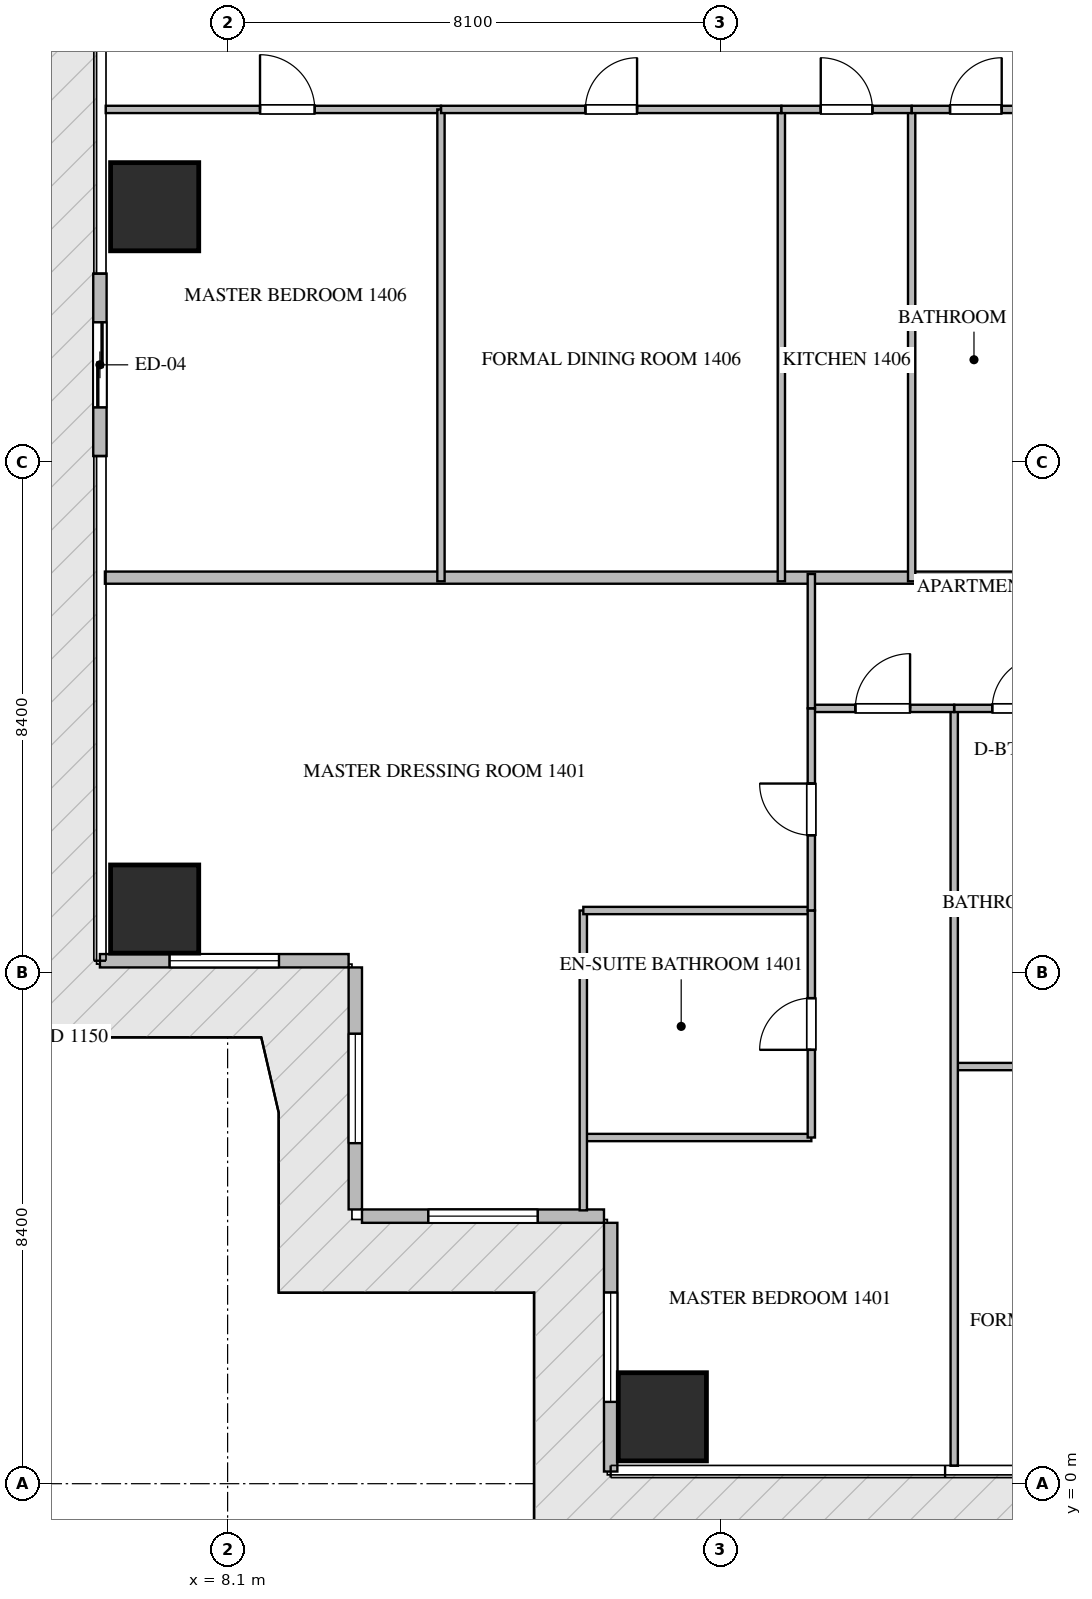
"""IFC4 building model, lengths in metres.
Left out: names, types, materials, properties, quantities, classifications, styles, units other than length and angle.
Written with IfcOpenShell. Run it as: python <this file> out.ifc"""

import sys

from ifc_helpers import new_model, si_unit, direction, frame, frame_2d, origin, origin_2d, place, context, subcontext, project, spatial, rectangle, extrude, source, transform, mapped, element, fill, save


model = new_model("IFC4")
c1 = context("Model", 3, precision=1e-05, world=origin(), true_north=direction((0.0, 1.0)))
c2 = subcontext(c1, "Body", "Model", "MODEL_VIEW")
j1 = project(units=[si_unit("LENGTHUNIT", "METRE"), si_unit("PLANEANGLEUNIT", "RADIAN")], contexts=[c1])
p1 = place(None, origin())
s1 = spatial("IfcSite", under=j1, at=p1, CompositionType="ELEMENT")
p2 = place(p1, origin())
s2 = spatial("IfcBuilding", under=s1, at=p2, CompositionType="ELEMENT")
p3 = place(p2, frame((0.0, 0.0, 60.45)))
s3 = spatial("IfcBuildingStorey", under=s2, at=p3, CompositionType="ELEMENT", Elevation=60.45)
m1 = source(origin(), c2, "Body", "SweptSolid", [
    extrude(rectangle(XDim=1.45, YDim=1.45, at=origin_2d()), origin(), (0.0, 0.0, 1.0), 3.75),
])
for number, where, z_axis, x_axis in (
    (1, (15.25, 1.1, -0.26), (0.0, 0.0, 1.0), (1.0, 0.0, 0.0)),
    (2, (6.9, 9.45, -0.26), (0.0, 0.0, 1.0), (1.0, 0.0, 0.0)),
    (3, (6.9, 21.0, -0.26), (0.0, 0.0, 1.0), (1.0, 0.0, 0.0)),
):
    element("IfcColumn", number, at=place(p3, frame(where, z_axis=z_axis, x_axis=x_axis)), inside=s3, PredefinedType="COLUMN", context=c2, shape_type="MappedRepresentation", body=[
        mapped(m1, transform((0.0, 0.0, 0.0), scale=1.0)),
    ])
p4 = place(p3, frame((6.0, 19.9, 0.0), z_axis=(0.0, 0.0, 1.0), x_axis=(0.0, -1.0, 0.0)))
e4 = element("IfcWall", 4, at=p4, inside=s3, PredefinedType="ELEMENTEDWALL", context=c2, shape_type="SweptSolid", body=[
    extrude(rectangle(XDim=3.0, YDim=0.22, at=frame_2d((1.5, 0.0))), origin(), (0.0, 0.0, 1.0), 3.475),
])
p5 = place(p4, frame((0.8, 0.0, 0.0)))
e5 = element("IfcOpeningElement", 5, at=p5, cuts=e4, PredefinedType="OPENING", context=c2, shape_type="SweptSolid", body=[
    extrude(rectangle(XDim=1.4, YDim=2.25, at=frame_2d((0.7, 1.125))), frame((0.0, 0.12, 0.0), z_axis=(0.0, -1.0, 0.0), x_axis=(1.0, 0.0, 0.0)), (0.0, 0.0, 1.0), 0.24),
])
p6 = place(p3, frame((6.0, 8.6, 0.0), z_axis=(0.0, 0.0, 1.0), x_axis=(1.0, 0.0, 0.0)))
e6 = element("IfcWall", 6, at=p6, inside=s3, PredefinedType="ELEMENTEDWALL", context=c2, shape_type="SweptSolid", body=[
    extrude(rectangle(XDim=4.09, YDim=0.22, at=frame_2d((2.045, 0.0))), origin(), (0.0, 0.0, 1.0), 3.475),
])
p7 = place(p6, frame((1.145, 0.0, 0.65)))
e7 = element("IfcOpeningElement", 7, at=p7, cuts=e6, PredefinedType="OPENING", context=c2, shape_type="SweptSolid", body=[
    extrude(rectangle(XDim=1.8, YDim=2.1, at=frame_2d((0.9, 1.05))), frame((0.0, 0.12, 0.0), z_axis=(0.0, -1.0, 0.0), x_axis=(1.0, 0.0, 0.0)), (0.0, 0.0, 1.0), 0.24),
])
p8 = place(p3, frame((10.2, 8.49, 0.0), z_axis=(0.0, 0.0, 1.0), x_axis=(0.0, -1.0, 0.0)))
e8 = element("IfcWall", 8, at=p8, inside=s3, PredefinedType="ELEMENTEDWALL", context=c2, shape_type="SweptSolid", body=[
    extrude(rectangle(XDim=3.98, YDim=0.22, at=frame_2d((1.99, 0.0))), origin(), (0.0, 0.0, 1.0), 3.475),
])
p9 = place(p8, frame((1.09, 0.0, 0.65)))
e9 = element("IfcOpeningElement", 9, at=p9, cuts=e8, PredefinedType="OPENING", context=c2, shape_type="SweptSolid", body=[
    extrude(rectangle(XDim=1.8, YDim=2.1, at=frame_2d((0.9, 1.05))), frame((0.0, 0.12, 0.0), z_axis=(0.0, -1.0, 0.0), x_axis=(1.0, 0.0, 0.0)), (0.0, 0.0, 1.0), 0.24),
])
p10 = place(p3, frame((10.31, 4.4, 0.0), z_axis=(0.0, 0.0, 1.0), x_axis=(1.0, 0.0, 0.0)))
e10 = element("IfcWall", 10, at=p10, inside=s3, PredefinedType="ELEMENTEDWALL", context=c2, shape_type="SweptSolid", body=[
    extrude(rectangle(XDim=3.98, YDim=0.22, at=frame_2d((1.99, 0.0))), origin(), (0.0, 0.0, 1.0), 3.475),
])
p11 = place(p10, frame((1.09, 0.0, 0.65)))
e11 = element("IfcOpeningElement", 11, at=p11, cuts=e10, PredefinedType="OPENING", context=c2, shape_type="SweptSolid", body=[
    extrude(rectangle(XDim=1.8, YDim=2.1, at=frame_2d((0.9, 1.05))), frame((0.0, 0.12, 0.0), z_axis=(0.0, -1.0, 0.0), x_axis=(1.0, 0.0, 0.0)), (0.0, 0.0, 1.0), 0.24),
])
p12 = place(p3, frame((14.4, 4.29, 0.0), z_axis=(0.0, 0.0, 1.0), x_axis=(0.0, -1.0, 0.0)))
e12 = element("IfcWall", 12, at=p12, inside=s3, PredefinedType="ELEMENTEDWALL", context=c2, shape_type="SweptSolid", body=[
    extrude(rectangle(XDim=4.09, YDim=0.22, at=frame_2d((2.045, 0.0))), origin(), (0.0, 0.0, 1.0), 3.475),
])
p13 = place(p12, frame((1.145, 0.0, 0.65)))
e13 = element("IfcOpeningElement", 13, at=p13, cuts=e12, PredefinedType="OPENING", context=c2, shape_type="SweptSolid", body=[
    extrude(rectangle(XDim=1.8, YDim=2.1, at=frame_2d((0.9, 1.05))), frame((0.0, 0.12, 0.0), z_axis=(0.0, -1.0, 0.0), x_axis=(1.0, 0.0, 0.0)), (0.0, 0.0, 1.0), 0.24),
])
p14 = place(p3, frame((6.082, 14.9, 0.0), z_axis=(0.0, 0.0, 1.0), x_axis=(1.0, 0.0, 0.0)))
e14 = element("IfcWall", 14, at=p14, inside=s3, PredefinedType="PARTITIONING", context=c2, shape_type="SweptSolid", body=[
    extrude(rectangle(XDim=15.318, YDim=0.2, at=frame_2d((7.659, 0.0))), origin(), (0.0, 0.0, 1.0), 3.49),
])
p15 = place(p3, frame((20.05, 6.86, 0.0), z_axis=(0.0, 0.0, 1.0), x_axis=(1.0, 0.0, 0.0)))
e15 = element("IfcWall", 15, at=p15, inside=s3, PredefinedType="PARTITIONING", context=c2, shape_type="SweptSolid", body=[
    extrude(rectangle(XDim=5.15, YDim=0.12, at=frame_2d((2.575, 0.0))), origin(), (0.0, 0.0, 1.0), 3.49),
])
p16 = place(p3, frame((20.05, 0.295, 0.0), z_axis=(0.0, 0.0, 1.0), x_axis=(0.0, 1.0, 0.0)))
e16 = element("IfcWall", 16, at=p16, inside=s3, PredefinedType="PARTITIONING", context=c2, shape_type="SweptSolid", body=[
    extrude(rectangle(XDim=12.455, YDim=0.12, at=frame_2d((6.228, 0.0))), origin(), (0.0, 0.0, 1.0), 3.49),
])
p17 = place(p3, frame((20.05, 12.75, 0.0), z_axis=(0.0, 0.0, 1.0), x_axis=(1.0, 0.0, 0.0)))
e17 = element("IfcWall", 17, at=p17, inside=s3, PredefinedType="PARTITIONING", context=c2, shape_type="SweptSolid", body=[
    extrude(rectangle(XDim=2.1, YDim=0.12, at=frame_2d((1.05, 0.0))), origin(), (0.0, 0.0, 1.0), 3.49),
])
p18 = place(p17, frame((0.625, 0.0, 0.0)))
e18 = element("IfcOpeningElement", 18, at=p18, cuts=e17, PredefinedType="OPENING", context=c2, shape_type="SweptSolid", body=[
    extrude(rectangle(XDim=0.85, YDim=2.1, at=frame_2d((0.425, 1.05))), frame((0.0, 0.07, 0.0), z_axis=(0.0, -1.0, 0.0), x_axis=(1.0, 0.0, 0.0)), (0.0, 0.0, 1.0), 0.14),
])
p19 = place(p3, frame((17.7, 12.75, 0.0), z_axis=(0.0, 0.0, 1.0), x_axis=(1.0, 0.0, 0.0)))
e19 = element("IfcWall", 19, at=p19, inside=s3, PredefinedType="PARTITIONING", context=c2, shape_type="SweptSolid", body=[
    extrude(rectangle(XDim=2.348, YDim=0.12, at=frame_2d((1.174, 0.0))), origin(), (0.0, 0.0, 1.0), 3.49),
])
p20 = place(p19, frame((0.724, 0.0, 0.0)))
e20 = element("IfcOpeningElement", 20, at=p20, cuts=e19, PredefinedType="OPENING", context=c2, shape_type="SweptSolid", body=[
    extrude(rectangle(XDim=0.9, YDim=2.1, at=frame_2d((0.45, 1.05))), frame((0.0, 0.07, 0.0), z_axis=(0.0, -1.0, 0.0), x_axis=(1.0, 0.0, 0.0)), (0.0, 0.0, 1.0), 0.14),
])
p21 = place(p3, frame((13.95, 5.693, 0.0), z_axis=(0.0, 0.0, 1.0), x_axis=(1.0, 0.0, 0.0)))
e21 = element("IfcWall", 21, at=p21, inside=s3, PredefinedType="PARTITIONING", context=c2, shape_type="SweptSolid", body=[
    extrude(rectangle(XDim=3.75, YDim=0.12, at=frame_2d((1.875, 0.0))), origin(), (0.0, 0.0, 1.0), 3.49),
])
p22 = place(p3, frame((13.95, 4.495, 0.0), z_axis=(0.0, 0.0, 1.0), x_axis=(0.0, 1.0, 0.0)))
e22 = element("IfcWall", 22, at=p22, inside=s3, PredefinedType="PARTITIONING", context=c2, shape_type="SweptSolid", body=[
    extrude(rectangle(XDim=4.931, YDim=0.12, at=frame_2d((2.465, 0.0))), origin(), (0.0, 0.0, 1.0), 3.49),
])
p23 = place(p3, frame((13.95, 9.426, 0.0), z_axis=(0.0, 0.0, 1.0), x_axis=(1.0, 0.0, 0.0)))
e23 = element("IfcWall", 23, at=p23, inside=s3, PredefinedType="PARTITIONING", context=c2, shape_type="SweptSolid", body=[
    extrude(rectangle(XDim=3.75, YDim=0.12, at=frame_2d((1.875, 0.0))), origin(), (0.0, 0.0, 1.0), 2.922),
])
p24 = place(p3, frame((17.7, 5.693, 0.0), z_axis=(0.0, 0.0, 1.0), x_axis=(0.0, 1.0, 0.0)))
e24 = element("IfcWall", 24, at=p24, inside=s3, PredefinedType="PARTITIONING", context=c2, shape_type="SweptSolid", body=[
    extrude(rectangle(XDim=3.733, YDim=0.12, at=frame_2d((1.866, 0.0))), origin(), (0.0, 0.0, 1.0), 3.49),
])
p25 = place(p24, frame((1.442, 0.0, 0.0)))
e25 = element("IfcOpeningElement", 25, at=p25, cuts=e24, PredefinedType="OPENING", context=c2, shape_type="SweptSolid", body=[
    extrude(rectangle(XDim=0.85, YDim=2.1, at=frame_2d((0.425, 1.05))), frame((0.0, 0.07, 0.0), z_axis=(0.0, -1.0, 0.0), x_axis=(1.0, 0.0, 0.0)), (0.0, 0.0, 1.0), 0.14),
])
p26 = place(p3, frame((17.7, 9.428, 0.0), z_axis=(0.0, 0.0, 1.0), x_axis=(0.0, 1.0, 0.0)))
e26 = element("IfcWall", 26, at=p26, inside=s3, PredefinedType="PARTITIONING", context=c2, shape_type="SweptSolid", body=[
    extrude(rectangle(XDim=3.322, YDim=0.12, at=frame_2d((1.661, 0.0))), origin(), (0.0, 0.0, 1.0), 3.49),
])
p27 = place(p26, frame((1.236, 0.0, 0.0)))
e27 = element("IfcOpeningElement", 27, at=p27, cuts=e26, PredefinedType="OPENING", context=c2, shape_type="SweptSolid", body=[
    extrude(rectangle(XDim=0.85, YDim=2.1, at=frame_2d((0.425, 1.05))), frame((0.0, 0.07, 0.0), z_axis=(0.0, -1.0, 0.0), x_axis=(1.0, 0.0, 0.0)), (0.0, 0.0, 1.0), 0.14),
])
p28 = place(p3, frame((17.7, 12.752, 0.0), z_axis=(0.0, 0.0, 1.0), x_axis=(0.0, 1.0, 0.0)))
e28 = element("IfcWall", 28, at=p28, inside=s3, PredefinedType="PARTITIONING", context=c2, shape_type="SweptSolid", body=[
    extrude(rectangle(XDim=2.208, YDim=0.12, at=frame_2d((1.104, 0.0))), origin(), (0.0, 0.0, 1.0), 3.49),
])
p29 = place(p3, frame((6.095, 22.6, 0.0), z_axis=(0.0, 0.0, 1.0), x_axis=(1.0, 0.0, 0.0)))
e29 = element("IfcWall", 29, at=p29, inside=s3, PredefinedType="PARTITIONING", context=c2, shape_type="SweptSolid", body=[
    extrude(rectangle(XDim=5.514, YDim=0.12, at=frame_2d((2.757, 0.0))), origin(), (0.0, 0.0, 1.0), 3.49),
])
p30 = place(p29, frame((2.538, 0.0, 0.0)))
e30 = element("IfcOpeningElement", 30, at=p30, cuts=e29, PredefinedType="OPENING", context=c2, shape_type="SweptSolid", body=[
    extrude(rectangle(XDim=0.9, YDim=2.1, at=frame_2d((0.45, 1.05))), frame((0.0, 0.07, 0.0), z_axis=(0.0, -1.0, 0.0), x_axis=(1.0, 0.0, 0.0)), (0.0, 0.0, 1.0), 0.14),
])
for number, where, z_axis, x_axis in (
    (31, (11.609, 14.84, 0.0), (0.0, 0.0, 1.0), (0.0, 1.0, 0.0)),
    (32, (17.207, 14.84, 0.0), (0.0, 0.0, 1.0), (0.0, 1.0, 0.0)),
    (33, (19.35, 14.84, 0.0), (0.0, 0.0, 1.0), (0.0, 1.0, 0.0)),
):
    element("IfcWall", number, at=place(p3, frame(where, z_axis=z_axis, x_axis=x_axis)), inside=s3, PredefinedType="PARTITIONING", context=c2, shape_type="SweptSolid", body=[
        extrude(rectangle(XDim=7.76, YDim=0.12, at=frame_2d((3.88, 0.0))), origin(), (0.0, 0.0, 1.0), 3.49),
    ])
p31 = place(p3, frame((11.611, 22.6, 0.0), z_axis=(0.0, 0.0, 1.0), x_axis=(1.0, 0.0, 0.0)))
e34 = element("IfcWall", 34, at=p31, inside=s3, PredefinedType="PARTITIONING", context=c2, shape_type="SweptSolid", body=[
    extrude(rectangle(XDim=5.596, YDim=0.12, at=frame_2d((2.798, 0.0))), origin(), (0.0, 0.0, 1.0), 3.49),
])
p32 = place(p31, frame((2.373, 0.0, 0.0)))
e35 = element("IfcOpeningElement", 35, at=p32, cuts=e34, PredefinedType="OPENING", context=c2, shape_type="SweptSolid", body=[
    extrude(rectangle(XDim=0.85, YDim=2.1, at=frame_2d((0.425, 1.05))), frame((0.0, 0.07, 0.0), z_axis=(0.0, -1.0, 0.0), x_axis=(1.0, 0.0, 0.0)), (0.0, 0.0, 1.0), 0.14),
])
p33 = place(p3, frame((17.209, 22.6, 0.0), z_axis=(0.0, 0.0, 1.0), x_axis=(1.0, 0.0, 0.0)))
e36 = element("IfcWall", 36, at=p33, inside=s3, PredefinedType="PARTITIONING", context=c2, shape_type="SweptSolid", body=[
    extrude(rectangle(XDim=2.141, YDim=0.12, at=frame_2d((1.071, 0.0))), origin(), (0.0, 0.0, 1.0), 3.49),
])
p34 = place(p33, frame((0.646, 0.0, 0.0)))
e37 = element("IfcOpeningElement", 37, at=p34, cuts=e36, PredefinedType="OPENING", context=c2, shape_type="SweptSolid", body=[
    extrude(rectangle(XDim=0.85, YDim=2.1, at=frame_2d((0.425, 1.05))), frame((0.0, 0.07, 0.0), z_axis=(0.0, -1.0, 0.0), x_axis=(1.0, 0.0, 0.0)), (0.0, 0.0, 1.0), 0.14),
])
p35 = place(p3, frame((19.352, 22.6, 0.0), z_axis=(0.0, 0.0, 1.0), x_axis=(1.0, 0.0, 0.0)))
e38 = element("IfcWall", 38, at=p35, inside=s3, PredefinedType="PARTITIONING", context=c2, shape_type="SweptSolid", body=[
    extrude(rectangle(XDim=2.108, YDim=0.12, at=frame_2d((1.054, 0.0))), origin(), (0.0, 0.0, 1.0), 3.49),
])
p36 = place(p35, frame((0.629, 0.0, 0.0)))
e39 = element("IfcOpeningElement", 39, at=p36, cuts=e38, PredefinedType="OPENING", context=c2, shape_type="SweptSolid", body=[
    extrude(rectangle(XDim=0.85, YDim=2.1, at=frame_2d((0.425, 1.05))), frame((0.0, 0.07, 0.0), z_axis=(0.0, -1.0, 0.0), x_axis=(1.0, 0.0, 0.0)), (0.0, 0.0, 1.0), 0.14),
])
m2 = source(origin(), c2, "Body", "SweptSolid", [
    extrude(rectangle(XDim=1.4, YDim=2.25, at=frame_2d((0.7, 1.125))), frame((0.0, 0.025, 0.0), z_axis=(0.0, -1.0, 0.0), x_axis=(1.0, 0.0, 0.0)), (0.0, 0.0, 1.0), 0.05),
])
p37 = place(p5, origin())
e40 = element("IfcDoor", 40, at=p37, inside=s3, OperationType="SLIDING_TO_LEFT", PredefinedType="DOOR", context=c2, shape_type="MappedRepresentation", body=[
    mapped(m2, transform((0.0, 0.0, 0.0), scale=1.0)),
])
fill(e5, e40)
m3 = source(origin(), c2, "Body", "SweptSolid", [
    extrude(rectangle(XDim=1.8, YDim=2.1, at=frame_2d((0.9, 1.05))), frame((0.0, 0.03, 0.0), z_axis=(0.0, -1.0, 0.0), x_axis=(1.0, 0.0, 0.0)), (0.0, 0.0, 1.0), 0.06),
])
p38 = place(p7, origin())
e41 = element("IfcWindow", 41, at=p38, inside=s3, PartitioningType="SINGLE_PANEL", PredefinedType="WINDOW", context=c2, shape_type="MappedRepresentation", body=[
    mapped(m3, transform((0.0, 0.0, 0.0), scale=1.0)),
])
fill(e7, e41)
p39 = place(p9, origin())
e42 = element("IfcWindow", 42, at=p39, inside=s3, PartitioningType="SINGLE_PANEL", PredefinedType="WINDOW", context=c2, shape_type="MappedRepresentation", body=[
    mapped(m3, transform((0.0, 0.0, 0.0), scale=1.0)),
])
fill(e9, e42)
p40 = place(p11, origin())
e43 = element("IfcWindow", 43, at=p40, inside=s3, PartitioningType="SINGLE_PANEL", PredefinedType="WINDOW", context=c2, shape_type="MappedRepresentation", body=[
    mapped(m3, transform((0.0, 0.0, 0.0), scale=1.0)),
])
fill(e11, e43)
p41 = place(p13, origin())
e44 = element("IfcWindow", 44, at=p41, inside=s3, PartitioningType="SINGLE_PANEL", PredefinedType="WINDOW", context=c2, shape_type="MappedRepresentation", body=[
    mapped(m3, transform((0.0, 0.0, 0.0), scale=1.0)),
])
fill(e13, e44)
m4 = source(origin(), c2, "Body", "SweptSolid", [
    extrude(rectangle(XDim=0.85, YDim=2.1, at=frame_2d((0.425, 1.05))), frame((0.0, 0.025, 0.0), z_axis=(0.0, -1.0, 0.0), x_axis=(1.0, 0.0, 0.0)), (0.0, 0.0, 1.0), 0.05),
])
p42 = place(p18, origin())
e45 = element("IfcDoor", 45, at=p42, inside=s3, OperationType="SINGLE_SWING_RIGHT", PredefinedType="DOOR", context=c2, shape_type="MappedRepresentation", body=[
    mapped(m4, transform((0.0, 0.0, 0.0), scale=1.0)),
])
fill(e18, e45)
m5 = source(origin(), c2, "Body", "SweptSolid", [
    extrude(rectangle(XDim=0.9, YDim=2.1, at=frame_2d((0.45, 1.05))), frame((0.0, 0.025, 0.0), z_axis=(0.0, -1.0, 0.0), x_axis=(1.0, 0.0, 0.0)), (0.0, 0.0, 1.0), 0.05),
])
p43 = place(p20, origin())
e46 = element("IfcDoor", 46, at=p43, inside=s3, OperationType="SINGLE_SWING_RIGHT", PredefinedType="DOOR", context=c2, shape_type="MappedRepresentation", body=[
    mapped(m5, transform((0.0, 0.0, 0.0), scale=1.0)),
])
fill(e20, e46)
p44 = place(p25, origin())
e47 = element("IfcDoor", 47, at=p44, inside=s3, OperationType="SINGLE_SWING_LEFT", PredefinedType="DOOR", context=c2, shape_type="MappedRepresentation", body=[
    mapped(m4, transform((0.0, 0.0, 0.0), scale=1.0)),
])
fill(e25, e47)
p45 = place(p27, origin())
e48 = element("IfcDoor", 48, at=p45, inside=s3, OperationType="SINGLE_SWING_RIGHT", PredefinedType="DOOR", context=c2, shape_type="MappedRepresentation", body=[
    mapped(m4, transform((0.0, 0.0, 0.0), scale=1.0)),
])
fill(e27, e48)
p46 = place(p30, origin())
e49 = element("IfcDoor", 49, at=p46, inside=s3, OperationType="SINGLE_SWING_LEFT", PredefinedType="DOOR", context=c2, shape_type="MappedRepresentation", body=[
    mapped(m5, transform((0.0, 0.0, 0.0), scale=1.0)),
])
fill(e30, e49)
p47 = place(p32, origin())
e50 = element("IfcDoor", 50, at=p47, inside=s3, OperationType="SINGLE_SWING_RIGHT", PredefinedType="DOOR", context=c2, shape_type="MappedRepresentation", body=[
    mapped(m4, transform((0.0, 0.0, 0.0), scale=1.0)),
])
fill(e35, e50)
p48 = place(p34, origin())
e51 = element("IfcDoor", 51, at=p48, inside=s3, OperationType="SINGLE_SWING_LEFT", PredefinedType="DOOR", context=c2, shape_type="MappedRepresentation", body=[
    mapped(m4, transform((0.0, 0.0, 0.0), scale=1.0)),
])
fill(e37, e51)
p49 = place(p36, origin())
e52 = element("IfcDoor", 52, at=p49, inside=s3, OperationType="SINGLE_SWING_RIGHT", PredefinedType="DOOR", context=c2, shape_type="MappedRepresentation", body=[
    mapped(m4, transform((0.0, 0.0, 0.0), scale=1.0)),
])
fill(e39, e52)
save(model, sys.argv[1])
